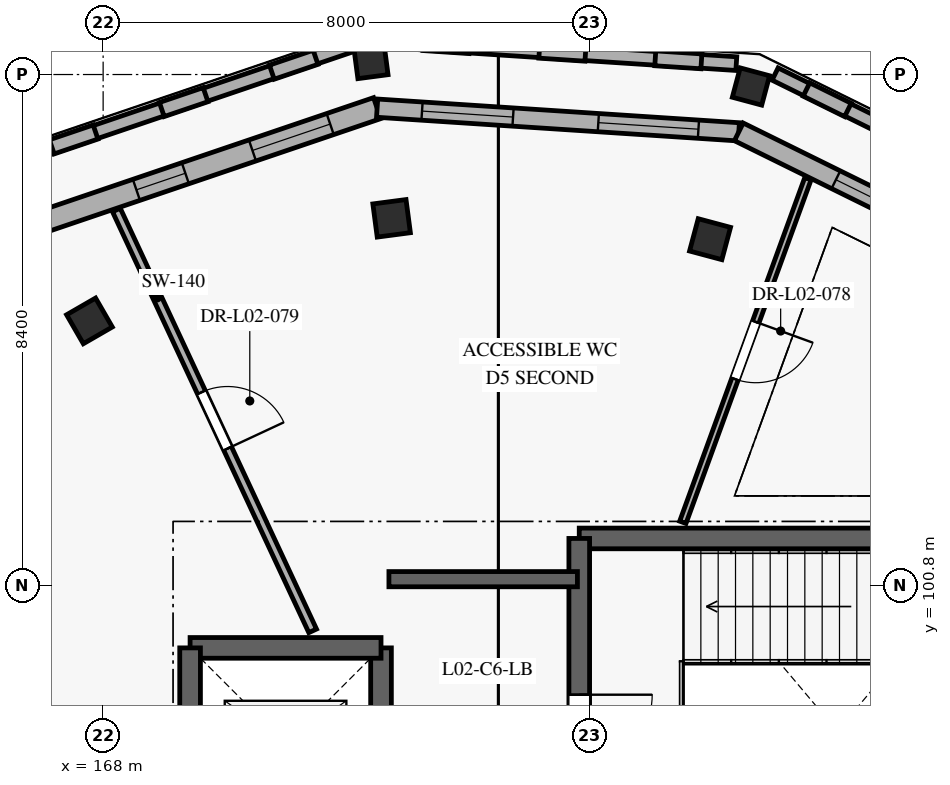
"""IFC4 building model, lengths in metres.
Left out: names, types, materials, properties, quantities, classifications, styles, units other than length and angle.
Written with IfcOpenShell. Run it as: python <this file> out.ifc"""

import sys

from ifc_helpers import new_model, si_unit, direction, frame, frame_2d, origin, origin_2d, place, context, subcontext, project, spatial, rectangle, extrude, element, fill, save


model = new_model("IFC4")
c1 = context("Model", 3, precision=1e-05, world=origin(), true_north=direction((0.0, 1.0)))
c2 = subcontext(c1, "Body", "Model", "MODEL_VIEW")
j1 = project(units=[si_unit("LENGTHUNIT", "METRE"), si_unit("PLANEANGLEUNIT", "RADIAN")], contexts=[c1])
p1 = place(None, origin())
s1 = spatial("IfcSite", under=j1, at=p1, CompositionType="ELEMENT")
p2 = place(p1, origin())
s2 = spatial("IfcBuilding", under=s1, at=p2, CompositionType="ELEMENT")
p3 = place(p2, frame((0.0, 0.0, 8.4)))
s3 = spatial("IfcBuildingStorey", under=s2, at=p3, CompositionType="ELEMENT", Elevation=8.4)
for number, where, z_axis, x_axis in (
    (1, (178.654, 109.003, 0.0), (0.0, 0.0, 1.0), (-0.966, 0.259, 0.0)),
    (2, (172.405, 109.413, 0.0), (0.0, 0.0, 1.0), (-0.991, -0.131, 0.0)),
):
    element("IfcColumn", number, at=place(p3, frame(where, z_axis=z_axis, x_axis=x_axis)), inside=s3, PredefinedType="COLUMN", context=c2, shape_type="SweptSolid", body=[
        extrude(rectangle(XDim=0.5, YDim=0.5, at=origin_2d()), origin(), (0.0, 0.0, 1.0), 4.2),
    ])
for number, where, z_axis, x_axis in (
    (3, (177.981, 106.492, 0.0), (0.0, 0.0, 1.0), (-0.966, 0.259, 0.0)),
    (4, (172.744, 106.835, 0.0), (0.0, 0.0, 1.0), (-0.991, -0.131, 0.0)),
    (5, (167.775, 105.148, 0.0), (0.0, 0.0, 1.0), (-0.866, -0.5, 0.0)),
):
    element("IfcColumn", number, at=place(p3, frame(where, z_axis=z_axis, x_axis=x_axis)), inside=s3, PredefinedType="COLUMN", context=c2, shape_type="SweptSolid", body=[
        extrude(rectangle(XDim=0.55, YDim=0.55, at=origin_2d()), origin(), (0.0, 0.0, 1.0), 4.2),
    ])
p4 = place(p3, frame((166.861, 106.731, 0.0), z_axis=(0.0, 0.0, 1.0), x_axis=(0.94693663561, 0.321420298269, 0.0)))
e6 = element("IfcWall", 6, at=p4, inside=s3, PredefinedType="SOLIDWALL", context=c2, shape_type="SweptSolid", body=[
    extrude(rectangle(XDim=5.961, YDim=0.365, at=frame_2d((2.98, 0.0))), origin(), (0.0, 0.0, 1.0), 3.94),
])
p5 = place(p4, frame((1.781, 0.0, 0.85)))
e7 = element("IfcOpeningElement", 7, at=p5, cuts=e6, PredefinedType="OPENING", context=c2, shape_type="SweptSolid", body=[
    extrude(rectangle(XDim=0.85, YDim=1.4, at=frame_2d((0.425, 0.7))), frame((0.0, 0.192, 0.0), z_axis=(0.0, -1.0, 0.0), x_axis=(1.0, 0.0, 0.0)), (0.0, 0.0, 1.0), 0.385),
])
p6 = place(p4, frame((3.796, 0.0, 0.85)))
e8 = element("IfcOpeningElement", 8, at=p6, cuts=e6, PredefinedType="OPENING", context=c2, shape_type="SweptSolid", body=[
    extrude(rectangle(XDim=1.35, YDim=1.6, at=frame_2d((0.675, 0.8))), frame((0.0, 0.192, 0.0), z_axis=(0.0, -1.0, 0.0), x_axis=(1.0, 0.0, 0.0)), (0.0, 0.0, 1.0), 0.385),
])
p7 = place(p3, frame((172.506, 108.647, 0.0), z_axis=(0.0, 0.0, 1.0), x_axis=(0.997858658418, -0.065407169492, 0.0)))
e9 = element("IfcWall", 9, at=p7, inside=s3, PredefinedType="SOLIDWALL", context=c2, shape_type="SweptSolid", body=[
    extrude(rectangle(XDim=5.961, YDim=0.3, at=frame_2d((2.98, 0.0))), origin(), (0.0, 0.0, 1.0), 3.94),
])
p8 = place(p7, frame((0.74, 0.0, 0.85)))
e10 = element("IfcOpeningElement", 10, at=p8, cuts=e9, PredefinedType="OPENING", context=c2, shape_type="SweptSolid", body=[
    extrude(rectangle(XDim=1.5, YDim=1.6, at=frame_2d((0.75, 0.8))), frame((0.0, 0.16, 0.0), z_axis=(0.0, -1.0, 0.0), x_axis=(1.0, 0.0, 0.0)), (0.0, 0.0, 1.0), 0.32),
])
p9 = place(p7, frame((3.646, 0.0, 0.85)))
e11 = element("IfcOpeningElement", 11, at=p9, cuts=e9, PredefinedType="OPENING", context=c2, shape_type="SweptSolid", body=[
    extrude(rectangle(XDim=1.65, YDim=1.6, at=frame_2d((0.825, 0.8))), frame((0.0, 0.16, 0.0), z_axis=(0.0, -1.0, 0.0), x_axis=(1.0, 0.0, 0.0)), (0.0, 0.0, 1.0), 0.32),
])
p10 = place(p3, frame((178.454, 108.257, 0.0), z_axis=(0.0, 0.0, 1.0), x_axis=(0.896879104746, -0.442275786664, 0.0)))
e12 = element("IfcWall", 12, at=p10, inside=s3, PredefinedType="SOLIDWALL", context=c2, shape_type="SweptSolid", body=[
    extrude(rectangle(XDim=5.961, YDim=0.325, at=frame_2d((2.98, 0.0))), origin(), (0.0, 0.0, 1.0), 3.94),
])
p11 = place(p10, frame((1.781, 0.0, 0.85)))
e13 = element("IfcOpeningElement", 13, at=p11, cuts=e12, PredefinedType="OPENING", context=c2, shape_type="SweptSolid", body=[
    extrude(rectangle(XDim=0.85, YDim=1.4, at=frame_2d((0.425, 0.7))), frame((0.0, 0.172, 0.0), z_axis=(0.0, -1.0, 0.0), x_axis=(1.0, 0.0, 0.0)), (0.0, 0.0, 1.0), 0.345),
])
p12 = place(p10, frame((3.496, 0.0, 0.85)))
e14 = element("IfcOpeningElement", 14, at=p12, cuts=e12, PredefinedType="OPENING", context=c2, shape_type="SweptSolid", body=[
    extrude(rectangle(XDim=1.95, YDim=1.6, at=frame_2d((0.975, 0.8))), frame((0.0, 0.172, 0.0), z_axis=(0.0, -1.0, 0.0), x_axis=(1.0, 0.0, 0.0)), (0.0, 0.0, 1.0), 0.345),
])
p13 = place(p3, frame((184.192, 106.673, 0.0), z_axis=(0.0, 0.0, 1.0), x_axis=(-0.896866705119, 0.442300930644, 0.0)))
e15 = element("IfcWall", 15, at=p13, inside=s3, PredefinedType="ELEMENTEDWALL", context=c2, shape_type="SweptSolid", body=[
    extrude(rectangle(XDim=5.733, YDim=0.225, at=frame_2d((2.866, 0.0))), origin(), (0.0, 0.0, 1.0), 1.09),
])
p14 = place(p3, frame((180.249, 108.618, 1.09), z_axis=(0.0, 0.0, 1.0), x_axis=(-0.896855160379, 0.442324339485, 0.0)))
e16 = element("IfcWall", 16, at=p14, inside=s3, PredefinedType="ELEMENTEDWALL", context=c2, shape_type="SweptSolid", body=[
    extrude(rectangle(XDim=0.76, YDim=0.245, at=frame_2d((0.38, 0.0))), origin(), (0.0, 0.0, 1.0), 2.85),
])
p15 = place(p3, frame((178.413, 109.379, 0.0), z_axis=(0.0, 0.0, 1.0), x_axis=(-0.99785804298, 0.065416558003, 0.0)))
e17 = element("IfcWall", 17, at=p15, inside=s3, PredefinedType="ELEMENTEDWALL", context=c2, shape_type="SweptSolid", body=[
    extrude(rectangle(XDim=5.732, YDim=0.225, at=frame_2d((2.866, 0.0))), origin(), (0.0, 0.0, 1.0), 1.09),
])
for number, where, z_axis, x_axis in (
    (18, (177.839, 109.417, 1.09), (0.0, 0.0, 1.0), (-0.998, 0.066, 0.0)),
    (19, (175.932, 109.542, 1.09), (0.0, 0.0, 1.0), (-0.998, 0.066, 0.0)),
    (20, (174.025, 109.667, 1.09), (0.0, 0.0, 1.0), (-0.998, 0.066, 0.0)),
):
    element("IfcWall", number, at=place(p3, frame(where, z_axis=z_axis, x_axis=x_axis)), inside=s3, PredefinedType="ELEMENTEDWALL", context=c2, shape_type="SweptSolid", body=[
        extrude(rectangle(XDim=0.76, YDim=0.245, at=frame_2d((0.38, 0.0))), origin(), (0.0, 0.0, 1.0), 2.85),
    ])
p16 = place(p3, frame((172.039, 109.668, 0.0), z_axis=(0.0, 0.0, 1.0), x_axis=(-0.946918286925, -0.321474350277, 0.0)))
e21 = element("IfcWall", 21, at=p16, inside=s3, PredefinedType="ELEMENTEDWALL", context=c2, shape_type="SweptSolid", body=[
    extrude(rectangle(XDim=5.732, YDim=0.225, at=frame_2d((2.866, 0.0))), origin(), (0.0, 0.0, 1.0), 1.09),
])
p17 = place(p3, frame((171.494, 109.483, 1.09), z_axis=(0.0, 0.0, 1.0), x_axis=(-0.946966478525, -0.321332364617, 0.0)))
e22 = element("IfcWall", 22, at=p17, inside=s3, PredefinedType="ELEMENTEDWALL", context=c2, shape_type="SweptSolid", body=[
    extrude(rectangle(XDim=0.76, YDim=0.245, at=frame_2d((0.38, 0.0))), origin(), (0.0, 0.0, 1.0), 2.85),
])
p18 = place(p3, frame((169.684, 108.869, 1.09), z_axis=(0.0, 0.0, 1.0), x_axis=(-0.946999642396, -0.32123461411, 0.0)))
e23 = element("IfcWall", 23, at=p18, inside=s3, PredefinedType="ELEMENTEDWALL", context=c2, shape_type="SweptSolid", body=[
    extrude(rectangle(XDim=0.76, YDim=0.245, at=frame_2d((0.38, 0.0))), origin(), (0.0, 0.0, 1.0), 2.85),
])
p19 = place(p3, frame((167.875, 108.254, 1.09), z_axis=(0.0, 0.0, 1.0), x_axis=(-0.946966478525, -0.321332364617, 0.0)))
e24 = element("IfcWall", 24, at=p19, inside=s3, PredefinedType="ELEMENTEDWALL", context=c2, shape_type="SweptSolid", body=[
    extrude(rectangle(XDim=0.76, YDim=0.245, at=frame_2d((0.38, 0.0))), origin(), (0.0, 0.0, 1.0), 2.85),
])
p20 = place(p3, frame((182.77, 101.57, 0.0), z_axis=(0.0, 0.0, 1.0), x_axis=(-1.0, 0.0, 0.0)))
e25 = element("IfcWall", 25, at=p20, inside=s3, PredefinedType="SHEAR", context=c2, shape_type="SweptSolid", body=[
    extrude(rectangle(XDim=6.94, YDim=0.34, at=frame_2d((3.47, 0.0))), origin(), (0.0, 0.0, 1.0), 3.95),
])
p21 = place(p3, frame((175.83, 101.57, 0.0), z_axis=(0.0, 0.0, 1.0), x_axis=(0.0, -1.0, 0.0)))
e26 = element("IfcWall", 26, at=p21, inside=s3, PredefinedType="SHEAR", context=c2, shape_type="SweptSolid", body=[
    extrude(rectangle(XDim=6.34, YDim=0.34, at=frame_2d((3.17, 0.0))), origin(), (0.0, 0.0, 1.0), 3.95),
])
p22 = place(p21, frame((2.57, 0.0, 0.0)))
e27 = element("IfcOpeningElement", 27, at=p22, cuts=e26, PredefinedType="OPENING", context=c2, shape_type="SweptSolid", body=[
    extrude(rectangle(XDim=1.2, YDim=2.1, at=frame_2d((0.6, 1.05))), frame((0.0, 0.18, 0.0), z_axis=(0.0, -1.0, 0.0), x_axis=(1.0, 0.0, 0.0)), (0.0, 0.0, 1.0), 0.36),
])
p23 = place(p3, frame((172.57, 96.63, 0.0), z_axis=(0.0, 0.0, 1.0), x_axis=(0.0, 1.0, 0.0)))
e28 = element("IfcWall", 28, at=p23, inside=s3, PredefinedType="SHEAR", context=c2, shape_type="SweptSolid", body=[
    extrude(rectangle(XDim=3.14, YDim=0.34, at=frame_2d((1.57, 0.0))), origin(), (0.0, 0.0, 1.0), 3.95),
])
p24 = place(p23, frame((1.02, 0.0, 0.0)))
e29 = element("IfcOpeningElement", 29, at=p24, cuts=e28, PredefinedType="OPENING", context=c2, shape_type="SweptSolid", body=[
    extrude(rectangle(XDim=1.1, YDim=2.1, at=frame_2d((0.55, 1.05))), frame((0.0, 0.18, 0.0), z_axis=(0.0, -1.0, 0.0), x_axis=(1.0, 0.0, 0.0)), (0.0, 0.0, 1.0), 0.36),
])
for number, where, z_axis, x_axis in (
    (30, (172.57, 99.77, 0.0), (0.0, 0.0, 1.0), (-1.0, 0.0, 0.0)),
    (31, (169.43, 99.77, 0.0), (0.0, 0.0, 1.0), (0.0, -1.0, 0.0)),
):
    element("IfcWall", number, at=place(p3, frame(where, z_axis=z_axis, x_axis=x_axis)), inside=s3, PredefinedType="SHEAR", context=c2, shape_type="SweptSolid", body=[
        extrude(rectangle(XDim=3.14, YDim=0.34, at=frame_2d((1.57, 0.0))), origin(), (0.0, 0.0, 1.0), 3.95),
    ])
p25 = place(p3, frame((175.8, 100.9, 0.0), z_axis=(0.0, 0.0, 1.0), x_axis=(-1.0, 0.0, 0.0)))
e32 = element("IfcWall", 32, at=p25, inside=s3, PredefinedType="SHEAR", context=c2, shape_type="SweptSolid", body=[
    extrude(rectangle(XDim=3.1, YDim=0.25, at=frame_2d((1.55, 0.0))), origin(), (0.0, 0.0, 1.0), 3.95),
])
p26 = place(p3, frame((179.591, 107.487, 0.0), z_axis=(0.0, 0.0, 1.0), x_axis=(-0.34203308638, -0.939687909798, 0.0)))
e33 = element("IfcWall", 33, at=p26, inside=s3, PredefinedType="PARTITIONING", context=c2, shape_type="SweptSolid", body=[
    extrude(rectangle(XDim=6.015, YDim=0.11, at=frame_2d((3.008, 0.0))), origin(), (0.0, 0.0, 1.0), 3.9),
])
p27 = place(p26, frame((2.508, 0.0, 0.0)))
e34 = element("IfcOpeningElement", 34, at=p27, cuts=e33, PredefinedType="OPENING", context=c2, shape_type="SweptSolid", body=[
    extrude(rectangle(XDim=1.0, YDim=2.1, at=frame_2d((0.5, 1.05))), frame((0.0, 0.065, 0.0), z_axis=(0.0, -1.0, 0.0), x_axis=(1.0, 0.0, 0.0)), (0.0, 0.0, 1.0), 0.13),
])
p28 = place(p3, frame((168.218, 106.972, 0.0), z_axis=(0.0, 0.0, 1.0), x_axis=(0.422626470609, -0.906303959133, 0.0)))
e35 = element("IfcWall", 35, at=p28, inside=s3, PredefinedType="PLUMBINGWALL", context=c2, shape_type="SweptSolid", body=[
    extrude(rectangle(XDim=7.638, YDim=0.14, at=frame_2d((3.819, 0.0))), origin(), (0.0, 0.0, 1.0), 3.9),
])
p29 = place(p28, frame((3.309, 0.0, 0.0)))
e36 = element("IfcOpeningElement", 36, at=p29, cuts=e35, PredefinedType="OPENING", context=c2, shape_type="SweptSolid", body=[
    extrude(rectangle(XDim=1.02, YDim=2.06, at=frame_2d((0.51, 1.03))), frame((0.0, 0.08, 0.0), z_axis=(0.0, -1.0, 0.0), x_axis=(1.0, 0.0, 0.0)), (0.0, 0.0, 1.0), 0.16),
])
p30 = place(p5, origin())
e37 = element("IfcWindow", 37, at=p30, inside=s3, PartitioningType="SINGLE_PANEL", PredefinedType="WINDOW", context=c2, shape_type="SweptSolid", body=[
    extrude(rectangle(XDim=0.85, YDim=1.4, at=frame_2d((0.425, 0.7))), frame((0.0, 0.03, 0.0), z_axis=(0.0, -1.0, 0.0), x_axis=(1.0, 0.0, 0.0)), (0.0, 0.0, 1.0), 0.06),
])
fill(e7, e37)
p31 = place(p6, origin())
e38 = element("IfcWindow", 38, at=p31, inside=s3, PartitioningType="SINGLE_PANEL", PredefinedType="WINDOW", context=c2, shape_type="SweptSolid", body=[
    extrude(rectangle(XDim=1.35, YDim=1.6, at=frame_2d((0.675, 0.8))), frame((0.0, 0.03, 0.0), z_axis=(0.0, -1.0, 0.0), x_axis=(1.0, 0.0, 0.0)), (0.0, 0.0, 1.0), 0.06),
])
fill(e8, e38)
p32 = place(p8, origin())
e39 = element("IfcWindow", 39, at=p32, inside=s3, PartitioningType="SINGLE_PANEL", PredefinedType="WINDOW", context=c2, shape_type="SweptSolid", body=[
    extrude(rectangle(XDim=1.5, YDim=1.6, at=frame_2d((0.75, 0.8))), frame((0.0, 0.03, 0.0), z_axis=(0.0, -1.0, 0.0), x_axis=(1.0, 0.0, 0.0)), (0.0, 0.0, 1.0), 0.06),
])
fill(e10, e39)
p33 = place(p9, origin())
e40 = element("IfcWindow", 40, at=p33, inside=s3, PartitioningType="SINGLE_PANEL", PredefinedType="WINDOW", context=c2, shape_type="SweptSolid", body=[
    extrude(rectangle(XDim=1.65, YDim=1.6, at=frame_2d((0.825, 0.8))), frame((0.0, 0.03, 0.0), z_axis=(0.0, -1.0, 0.0), x_axis=(1.0, 0.0, 0.0)), (0.0, 0.0, 1.0), 0.06),
])
fill(e11, e40)
p34 = place(p11, origin())
e41 = element("IfcWindow", 41, at=p34, inside=s3, PartitioningType="SINGLE_PANEL", PredefinedType="WINDOW", context=c2, shape_type="SweptSolid", body=[
    extrude(rectangle(XDim=0.85, YDim=1.4, at=frame_2d((0.425, 0.7))), frame((0.0, 0.03, 0.0), z_axis=(0.0, -1.0, 0.0), x_axis=(1.0, 0.0, 0.0)), (0.0, 0.0, 1.0), 0.06),
])
fill(e13, e41)
p35 = place(p22, origin())
e42 = element("IfcDoor", 42, at=p35, inside=s3, OperationType="SINGLE_SWING_LEFT", PredefinedType="DOOR", context=c2, shape_type="SweptSolid", body=[
    extrude(rectangle(XDim=1.2, YDim=2.1, at=frame_2d((0.6, 1.05))), frame((0.0, 0.025, 0.0), z_axis=(0.0, -1.0, 0.0), x_axis=(1.0, 0.0, 0.0)), (0.0, 0.0, 1.0), 0.05),
])
fill(e27, e42)
p36 = place(p27, origin())
e43 = element("IfcDoor", 43, at=p36, inside=s3, OperationType="SINGLE_SWING_LEFT", PredefinedType="DOOR", context=c2, shape_type="SweptSolid", body=[
    extrude(rectangle(XDim=1.0, YDim=2.1, at=frame_2d((0.5, 1.05))), frame((0.0, 0.025, 0.0), z_axis=(0.0, -1.0, 0.0), x_axis=(1.0, 0.0, 0.0)), (0.0, 0.0, 1.0), 0.05),
])
fill(e34, e43)
p37 = place(p29, frame((1.02, 0.0, 0.0), z_axis=(0.0, 0.0, 1.0), x_axis=(-1.0, 0.0, 0.0)))
e44 = element("IfcDoor", 44, at=p37, inside=s3, OperationType="SINGLE_SWING_RIGHT", PredefinedType="DOOR", context=c2, shape_type="SweptSolid", body=[
    extrude(rectangle(XDim=1.02, YDim=2.06, at=frame_2d((0.51, 1.03))), frame((0.0, 0.025, 0.0), z_axis=(0.0, -1.0, 0.0), x_axis=(1.0, 0.0, 0.0)), (0.0, 0.0, 1.0), 0.05),
])
fill(e36, e44)
save(model, sys.argv[1])
